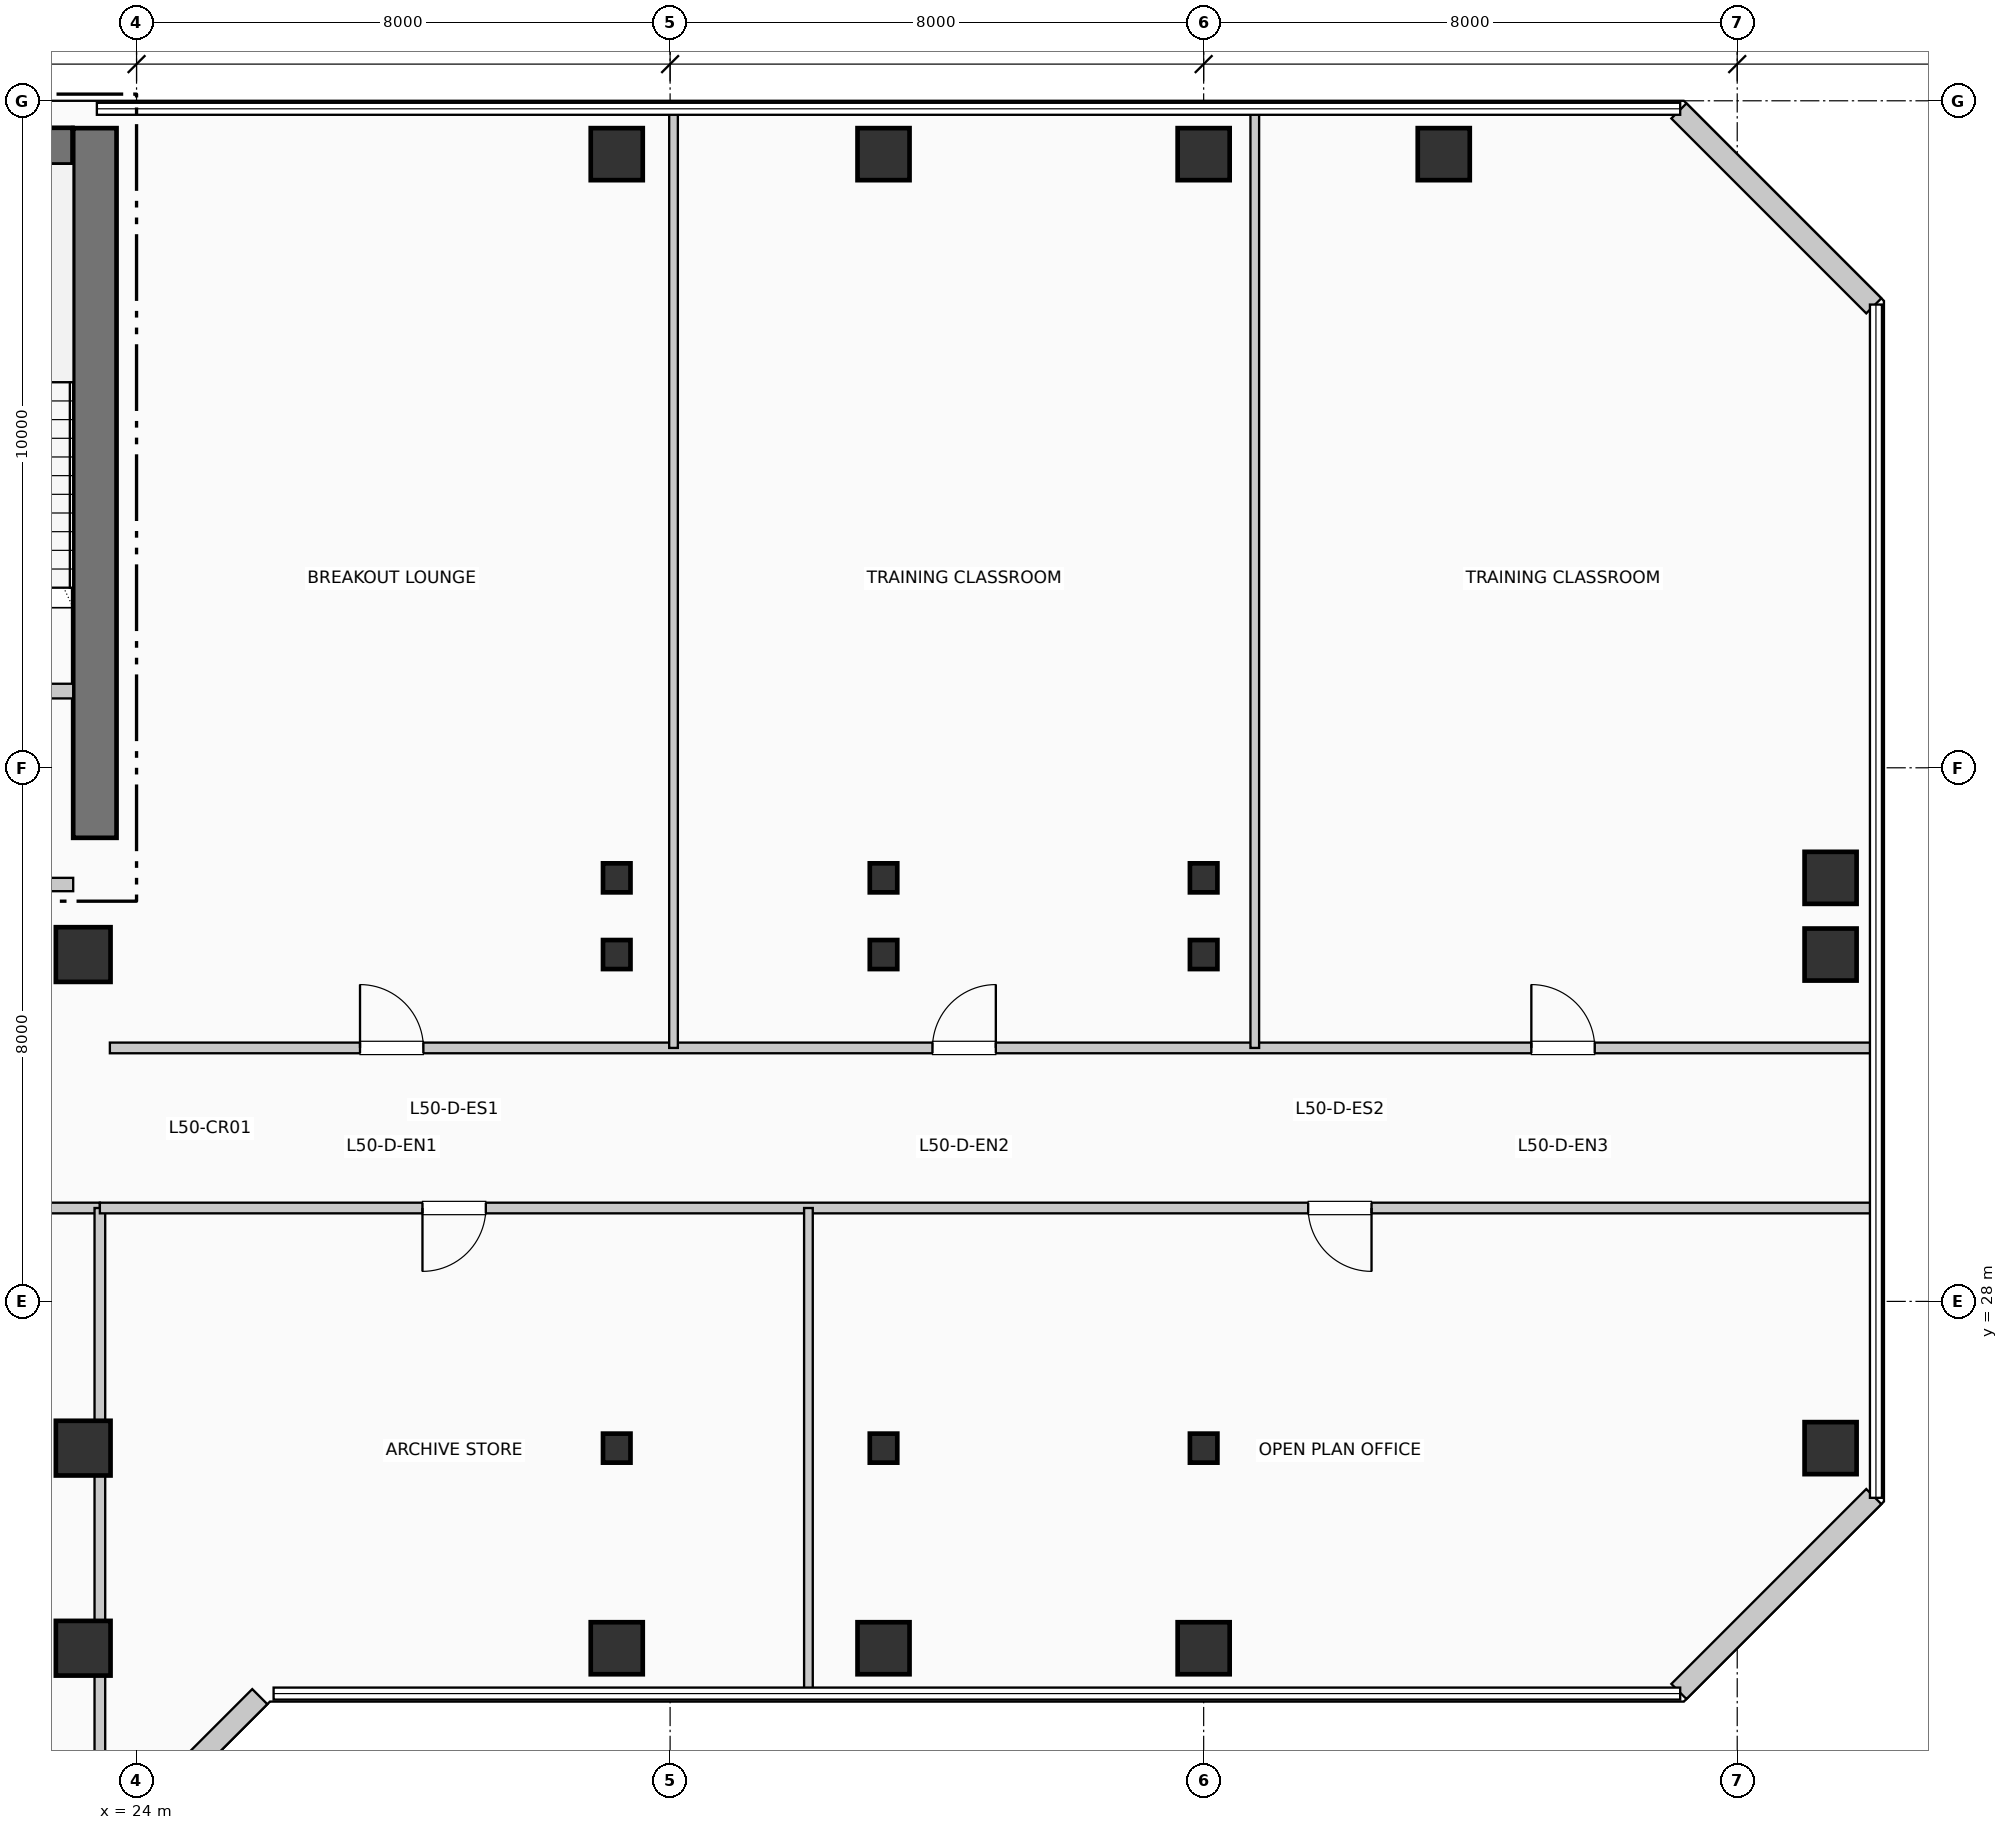
"""IFC4 building model, lengths in metres.
Left out: names, types, materials, properties, quantities, classifications, styles, units other than length and angle.
Written with IfcOpenShell. Run it as: python <this file> out.ifc"""

import sys

from ifc_helpers import new_model, si_unit, direction, frame, frame_2d, origin, origin_2d, place, context, subcontext, project, spatial, rectangle, i_section, extrude, element, fill, save


model = new_model("IFC4")
c1 = context("Model", 3, precision=1e-05, world=origin(), true_north=direction((0.0, 1.0)))
c2 = subcontext(c1, "Body", "Model", "MODEL_VIEW")
j1 = project(units=[si_unit("LENGTHUNIT", "METRE"), si_unit("PLANEANGLEUNIT", "RADIAN")], contexts=[c1])
p1 = place(None, origin())
s1 = spatial("IfcSite", under=j1, at=p1, CompositionType="ELEMENT")
p2 = place(p1, origin())
s2 = spatial("IfcBuilding", under=s1, at=p2, CompositionType="ELEMENT")
p3 = place(p2, frame((0.0, 0.0, 207.24)))
s3 = spatial("IfcBuildingStorey", under=s2, at=p3, CompositionType="ELEMENT", Elevation=207.24)
p4 = place(p3, frame((23.375, 34.95, 0.0), z_axis=(0.0, 0.0, 1.0), x_axis=(0.0, 1.0, 0.0)))
e1 = element("IfcWall", 1, at=p4, inside=s3, PredefinedType="SHEAR", context=c2, shape_type="SweptSolid", body=[
    extrude(rectangle(XDim=10.64, YDim=0.65, at=frame_2d((5.32, 0.0))), origin(), (0.0, 0.0, 1.0), 3.96),
])
p5 = place(p3, frame((19.35, 45.32, 0.0), z_axis=(0.0, 0.0, 1.0), x_axis=(1.0, 0.0, 0.0)))
e2 = element("IfcWall", 2, at=p5, inside=s3, PredefinedType="SHEAR", context=c2, shape_type="SweptSolid", body=[
    extrude(rectangle(XDim=3.69, YDim=0.55, at=frame_2d((1.845, 0.0))), origin(), (0.0, 0.0, 1.0), 3.96),
])
p6 = place(p5, frame((1.15, 0.0, 1.05)))
e3 = element("IfcOpeningElement", 3, at=p6, cuts=e2, PredefinedType="OPENING", context=c2, shape_type="SweptSolid", body=[
    extrude(rectangle(XDim=1.4, YDim=1.8, at=frame_2d((0.7, 0.9))), frame((0.0, 0.285, 0.0), z_axis=(0.0, -1.0, 0.0), x_axis=(1.0, 0.0, 0.0)), (0.0, 0.0, 1.0), 0.57),
])
for number, where, z_axis, x_axis in (
    (4, (23.2, 22.8, 0.0), (0.0, 0.0, 1.0), (1.0, 0.0, 0.0)),
    (5, (23.2, 25.8, 0.0), (0.0, 0.0, 1.0), (1.0, 0.0, 0.0)),
    (6, (23.2, 33.2, 0.0), (0.0, 0.0, 1.0), (1.0, 0.0, 0.0)),
):
    element("IfcColumn", number, at=place(p3, frame(where, z_axis=z_axis, x_axis=x_axis)), inside=s3, PredefinedType="COLUMN", context=c2, shape_type="SweptSolid", body=[
        extrude(rectangle(XDim=0.82, YDim=0.82, at=origin_2d()), origin(), (0.0, 0.0, 1.0), 3.96),
    ])
p7 = place(p3, frame((31.2, 22.8, 0.0), z_axis=(0.0, 0.0, 1.0), x_axis=(1.0, 0.0, 0.0)))
e7 = element("IfcColumn", 7, at=p7, inside=s3, PredefinedType="COLUMN", context=c2, shape_type="SweptSolid", body=[
    extrude(rectangle(XDim=0.78, YDim=0.78, at=origin_2d()), origin(), (0.0, 0.0, 1.0), 3.96),
])
for number, where, z_axis, x_axis in (
    (8, (31.2, 25.8, 0.0), (0.0, 0.0, 1.0), (1.0, 0.0, 0.0)),
    (9, (31.2, 33.2, 0.0), (0.0, 0.0, 1.0), (1.0, 0.0, 0.0)),
    (10, (31.2, 34.35, 0.0), (0.0, 0.0, 1.0), (1.0, 0.0, 0.0)),
):
    element("IfcColumn", number, at=place(p3, frame(where, z_axis=z_axis, x_axis=x_axis)), inside=s3, PredefinedType="COLUMN", context=c2, shape_type="SweptSolid", body=[
        extrude(i_section(OverallWidth=0.412, OverallDepth=0.435, WebThickness=0.027, FlangeThickness=0.043, at=origin_2d()), origin(), (0.0, 0.0, 1.0), 3.96),
    ])
for number, where, z_axis, x_axis in (
    (11, (31.2, 45.2, 0.0), (0.0, 0.0, 1.0), (1.0, 0.0, 0.0)),
    (12, (35.2, 22.8, 0.0), (0.0, 0.0, 1.0), (1.0, 0.0, 0.0)),
):
    element("IfcColumn", number, at=place(p3, frame(where, z_axis=z_axis, x_axis=x_axis)), inside=s3, PredefinedType="COLUMN", context=c2, shape_type="SweptSolid", body=[
        extrude(rectangle(XDim=0.78, YDim=0.78, at=origin_2d()), origin(), (0.0, 0.0, 1.0), 3.96),
    ])
for number, where, z_axis, x_axis in (
    (13, (35.2, 25.8, 0.0), (0.0, 0.0, 1.0), (1.0, 0.0, 0.0)),
    (14, (35.2, 33.2, 0.0), (0.0, 0.0, 1.0), (1.0, 0.0, 0.0)),
    (15, (35.2, 34.35, 0.0), (0.0, 0.0, 1.0), (1.0, 0.0, 0.0)),
):
    element("IfcColumn", number, at=place(p3, frame(where, z_axis=z_axis, x_axis=x_axis)), inside=s3, PredefinedType="COLUMN", context=c2, shape_type="SweptSolid", body=[
        extrude(i_section(OverallWidth=0.412, OverallDepth=0.435, WebThickness=0.027, FlangeThickness=0.043, at=origin_2d()), origin(), (0.0, 0.0, 1.0), 3.96),
    ])
for number, where, z_axis, x_axis in (
    (16, (35.2, 45.2, 0.0), (0.0, 0.0, 1.0), (1.0, 0.0, 0.0)),
    (17, (40.0, 22.8, 0.0), (0.0, 0.0, 1.0), (1.0, 0.0, 0.0)),
):
    element("IfcColumn", number, at=place(p3, frame(where, z_axis=z_axis, x_axis=x_axis)), inside=s3, PredefinedType="COLUMN", context=c2, shape_type="SweptSolid", body=[
        extrude(rectangle(XDim=0.78, YDim=0.78, at=origin_2d()), origin(), (0.0, 0.0, 1.0), 3.96),
    ])
for number, where, z_axis, x_axis in (
    (18, (40.0, 25.8, 0.0), (0.0, 0.0, 1.0), (1.0, 0.0, 0.0)),
    (19, (40.0, 33.2, 0.0), (0.0, 0.0, 1.0), (1.0, 0.0, 0.0)),
    (20, (40.0, 34.35, 0.0), (0.0, 0.0, 1.0), (1.0, 0.0, 0.0)),
):
    element("IfcColumn", number, at=place(p3, frame(where, z_axis=z_axis, x_axis=x_axis)), inside=s3, PredefinedType="COLUMN", context=c2, shape_type="SweptSolid", body=[
        extrude(i_section(OverallWidth=0.412, OverallDepth=0.435, WebThickness=0.027, FlangeThickness=0.043, at=origin_2d()), origin(), (0.0, 0.0, 1.0), 3.96),
    ])
for number, where, z_axis, x_axis in (
    (21, (40.0, 45.2, 0.0), (0.0, 0.0, 1.0), (1.0, 0.0, 0.0)),
    (22, (43.6, 45.2, 0.0), (0.0, 0.0, 1.0), (1.0, 0.0, 0.0)),
    (23, (49.4, 25.8, 0.0), (0.0, 0.0, 1.0), (1.0, 0.0, 0.0)),
    (24, (49.4, 33.2, 0.0), (0.0, 0.0, 1.0), (1.0, 0.0, 0.0)),
    (25, (49.4, 34.35, 0.0), (0.0, 0.0, 1.0), (1.0, 0.0, 0.0)),
):
    element("IfcColumn", number, at=place(p3, frame(where, z_axis=z_axis, x_axis=x_axis)), inside=s3, PredefinedType="COLUMN", context=c2, shape_type="SweptSolid", body=[
        extrude(rectangle(XDim=0.78, YDim=0.78, at=origin_2d()), origin(), (0.0, 0.0, 1.0), 3.96),
    ])
p8 = place(p3, frame((23.926, 20.152, 0.0), z_axis=(0.0, 0.0, 1.0), x_axis=(0.707106781187, 0.707106781187, 0.0)))
e26 = element("IfcWall", 26, at=p8, inside=s3, PredefinedType="SOLIDWALL", context=c2, shape_type="SweptSolid", body=[
    extrude(rectangle(XDim=2.718, YDim=0.32, at=frame_2d((1.359, 0.0))), origin(), (0.0, 0.0, 1.0), 3.71),
])
for number, where, z_axis, x_axis in (
    (27, (47.126, 22.152, 0.0), (0.0, 0.0, 1.0), (0.707, 0.707, 0.0)),
    (28, (50.048, 42.926, 0.0), (0.0, 0.0, 1.0), (-0.707, 0.707, 0.0)),
):
    element("IfcWall", number, at=place(p3, frame(where, z_axis=z_axis, x_axis=x_axis)), inside=s3, PredefinedType="SOLIDWALL", context=c2, shape_type="SweptSolid", body=[
        extrude(rectangle(XDim=4.133, YDim=0.32, at=frame_2d((2.066, 0.0))), origin(), (0.0, 0.0, 1.0), 3.71),
    ])
p9 = place(p3, frame((19.9, 37.15, 0.0), z_axis=(0.0, 0.0, 1.0), x_axis=(1.0, 0.0, 0.0)))
e29 = element("IfcWall", 29, at=p9, inside=s3, PredefinedType="PARTITIONING", context=c2, shape_type="SweptSolid", body=[
    extrude(rectangle(XDim=3.15, YDim=0.22, at=frame_2d((1.575, 0.0))), origin(), (0.0, 0.0, 1.0), 3.71),
])
p10 = place(p9, frame((2.05, 0.0, 0.0), z_axis=(0.0, 0.0, 1.0), x_axis=(-1.0, 0.0, 0.0)))
e30 = element("IfcOpeningElement", 30, at=p10, cuts=e29, PredefinedType="OPENING", context=c2, shape_type="SweptSolid", body=[
    extrude(rectangle(XDim=1.05, YDim=2.15, at=frame_2d((0.525, 1.075))), frame((0.0, 0.12, 0.0), z_axis=(0.0, -1.0, 0.0), x_axis=(1.0, 0.0, 0.0)), (0.0, 0.0, 1.0), 0.24),
])
p11 = place(p3, frame((19.8, 34.25, 0.0), z_axis=(0.0, 0.0, 1.0), x_axis=(1.0, 0.0, 0.0)))
e31 = element("IfcWall", 31, at=p11, inside=s3, PredefinedType="PARTITIONING", context=c2, shape_type="SweptSolid", body=[
    extrude(rectangle(XDim=3.25, YDim=0.2, at=frame_2d((1.625, 0.0))), origin(), (0.0, 0.0, 1.0), 3.71),
])
p12 = place(p11, frame((2.15, 0.0, 0.0), z_axis=(0.0, 0.0, 1.0), x_axis=(-1.0, 0.0, 0.0)))
e32 = element("IfcOpeningElement", 32, at=p12, cuts=e31, PredefinedType="OPENING", context=c2, shape_type="SweptSolid", body=[
    extrude(rectangle(XDim=1.1, YDim=2.15, at=frame_2d((0.55, 1.075))), frame((0.0, 0.11, 0.0), z_axis=(0.0, -1.0, 0.0), x_axis=(1.0, 0.0, 0.0)), (0.0, 0.0, 1.0), 0.22),
])
p13 = place(p3, frame((11.64, 29.4, 0.0), z_axis=(0.0, 0.0, 1.0), x_axis=(1.0, 0.0, 0.0)))
e33 = element("IfcWall", 33, at=p13, inside=s3, PredefinedType="PARTITIONING", context=c2, shape_type="SweptSolid", body=[
    extrude(rectangle(XDim=11.81, YDim=0.16, at=frame_2d((5.905, 0.0))), origin(), (0.0, 0.0, 1.0), 3.365),
])
p14 = place(p3, frame((23.45, 5.99, 0.0), z_axis=(0.0, 0.0, 1.0), x_axis=(0.0, 1.0, 0.0)))
e34 = element("IfcWall", 34, at=p14, inside=s3, PredefinedType="PARTITIONING", context=c2, shape_type="SweptSolid", body=[
    extrude(rectangle(XDim=23.41, YDim=0.16, at=frame_2d((11.705, 0.0))), origin(), (0.0, 0.0, 1.0), 3.095),
])
p15 = place(p3, frame((23.45, 29.4, 0.0), z_axis=(0.0, 0.0, 1.0), x_axis=(1.0, 0.0, 0.0)))
e35 = element("IfcWall", 35, at=p15, inside=s3, PredefinedType="PARTITIONING", context=c2, shape_type="SweptSolid", body=[
    extrude(rectangle(XDim=26.56, YDim=0.16, at=frame_2d((13.28, 0.0))), origin(), (0.0, 0.0, 1.0), 3.365),
])
p16 = place(p15, frame((5.787, 0.0, 0.0), z_axis=(0.0, 0.0, 1.0), x_axis=(-1.0, 0.0, 0.0)))
e36 = element("IfcOpeningElement", 36, at=p16, cuts=e35, PredefinedType="OPENING", context=c2, shape_type="SweptSolid", body=[
    extrude(rectangle(XDim=0.95, YDim=2.15, at=frame_2d((0.475, 1.075))), frame((0.0, 0.09, 0.0), z_axis=(0.0, -1.0, 0.0), x_axis=(1.0, 0.0, 0.0)), (0.0, 0.0, 1.0), 0.18),
])
p17 = place(p15, frame((19.067, 0.0, 0.0), z_axis=(0.0, 0.0, 1.0), x_axis=(-1.0, 0.0, 0.0)))
e37 = element("IfcOpeningElement", 37, at=p17, cuts=e35, PredefinedType="OPENING", context=c2, shape_type="SweptSolid", body=[
    extrude(rectangle(XDim=0.95, YDim=2.15, at=frame_2d((0.475, 1.075))), frame((0.0, 0.09, 0.0), z_axis=(0.0, -1.0, 0.0), x_axis=(1.0, 0.0, 0.0)), (0.0, 0.0, 1.0), 0.18),
])
p18 = place(p3, frame((23.6, 31.8, 0.0), z_axis=(0.0, 0.0, 1.0), x_axis=(1.0, 0.0, 0.0)))
e38 = element("IfcWall", 38, at=p18, inside=s3, PredefinedType="PARTITIONING", context=c2, shape_type="SweptSolid", body=[
    extrude(rectangle(XDim=26.41, YDim=0.16, at=frame_2d((13.205, 0.0))), origin(), (0.0, 0.0, 1.0), 3.71),
])
p19 = place(p18, frame((3.75, 0.0, 0.0)))
e39 = element("IfcOpeningElement", 39, at=p19, cuts=e38, PredefinedType="OPENING", context=c2, shape_type="SweptSolid", body=[
    extrude(rectangle(XDim=0.95, YDim=2.15, at=frame_2d((0.475, 1.075))), frame((0.0, 0.09, 0.0), z_axis=(0.0, -1.0, 0.0), x_axis=(1.0, 0.0, 0.0)), (0.0, 0.0, 1.0), 0.18),
])
p20 = place(p18, frame((12.334, 0.0, 0.0)))
e40 = element("IfcOpeningElement", 40, at=p20, cuts=e38, PredefinedType="OPENING", context=c2, shape_type="SweptSolid", body=[
    extrude(rectangle(XDim=0.95, YDim=2.15, at=frame_2d((0.475, 1.075))), frame((0.0, 0.09, 0.0), z_axis=(0.0, -1.0, 0.0), x_axis=(1.0, 0.0, 0.0)), (0.0, 0.0, 1.0), 0.18),
])
p21 = place(p18, frame((21.313, 0.0, 0.0)))
e41 = element("IfcOpeningElement", 41, at=p21, cuts=e38, PredefinedType="OPENING", context=c2, shape_type="SweptSolid", body=[
    extrude(rectangle(XDim=0.95, YDim=2.15, at=frame_2d((0.475, 1.075))), frame((0.0, 0.09, 0.0), z_axis=(0.0, -1.0, 0.0), x_axis=(1.0, 0.0, 0.0)), (0.0, 0.0, 1.0), 0.18),
])
p22 = place(p3, frame((34.074, 22.19, 0.0), z_axis=(0.0, 0.0, 1.0), x_axis=(0.0, 1.0, 0.0)))
e42 = element("IfcWall", 42, at=p22, inside=s3, PredefinedType="PARTITIONING", context=c2, shape_type="SweptSolid", body=[
    extrude(rectangle(XDim=7.21, YDim=0.13, at=frame_2d((3.605, 0.0))), origin(), (0.0, 0.0, 1.0), 3.71),
])
for number, where, z_axis, x_axis in (
    (43, (32.051, 31.8, 0.0), (0.0, 0.0, 1.0), (0.0, 1.0, 0.0)),
    (44, (40.767, 31.8, 0.0), (0.0, 0.0, 1.0), (0.0, 1.0, 0.0)),
):
    element("IfcWall", number, at=place(p3, frame(where, z_axis=z_axis, x_axis=x_axis)), inside=s3, PredefinedType="PARTITIONING", context=c2, shape_type="SweptSolid", body=[
        extrude(rectangle(XDim=14.01, YDim=0.13, at=frame_2d((7.005, 0.0))), origin(), (0.0, 0.0, 1.0), 3.71),
    ])
p23 = place(p16, origin())
e45 = element("IfcDoor", 45, at=p23, inside=s3, OperationType="SINGLE_SWING_LEFT", PredefinedType="DOOR", context=c2, shape_type="SweptSolid", body=[
    extrude(rectangle(XDim=0.95, YDim=2.15, at=frame_2d((0.475, 1.075))), frame((0.0, 0.025, 0.0), z_axis=(0.0, -1.0, 0.0), x_axis=(1.0, 0.0, 0.0)), (0.0, 0.0, 1.0), 0.05),
])
fill(e36, e45)
p24 = place(p17, origin())
e46 = element("IfcDoor", 46, at=p24, inside=s3, OperationType="SINGLE_SWING_RIGHT", PredefinedType="DOOR", context=c2, shape_type="SweptSolid", body=[
    extrude(rectangle(XDim=0.95, YDim=2.15, at=frame_2d((0.475, 1.075))), frame((0.0, 0.025, 0.0), z_axis=(0.0, -1.0, 0.0), x_axis=(1.0, 0.0, 0.0)), (0.0, 0.0, 1.0), 0.05),
])
fill(e37, e46)
p25 = place(p19, origin())
e47 = element("IfcDoor", 47, at=p25, inside=s3, OperationType="SINGLE_SWING_LEFT", PredefinedType="DOOR", context=c2, shape_type="SweptSolid", body=[
    extrude(rectangle(XDim=0.95, YDim=2.15, at=frame_2d((0.475, 1.075))), frame((0.0, 0.025, 0.0), z_axis=(0.0, -1.0, 0.0), x_axis=(1.0, 0.0, 0.0)), (0.0, 0.0, 1.0), 0.05),
])
fill(e39, e47)
p26 = place(p20, origin())
e48 = element("IfcDoor", 48, at=p26, inside=s3, OperationType="SINGLE_SWING_RIGHT", PredefinedType="DOOR", context=c2, shape_type="SweptSolid", body=[
    extrude(rectangle(XDim=0.95, YDim=2.15, at=frame_2d((0.475, 1.075))), frame((0.0, 0.025, 0.0), z_axis=(0.0, -1.0, 0.0), x_axis=(1.0, 0.0, 0.0)), (0.0, 0.0, 1.0), 0.05),
])
fill(e40, e48)
p27 = place(p21, origin())
e49 = element("IfcDoor", 49, at=p27, inside=s3, OperationType="SINGLE_SWING_LEFT", PredefinedType="DOOR", context=c2, shape_type="SweptSolid", body=[
    extrude(rectangle(XDim=0.95, YDim=2.15, at=frame_2d((0.475, 1.075))), frame((0.0, 0.025, 0.0), z_axis=(0.0, -1.0, 0.0), x_axis=(1.0, 0.0, 0.0)), (0.0, 0.0, 1.0), 0.05),
])
fill(e41, e49)
save(model, sys.argv[1])
